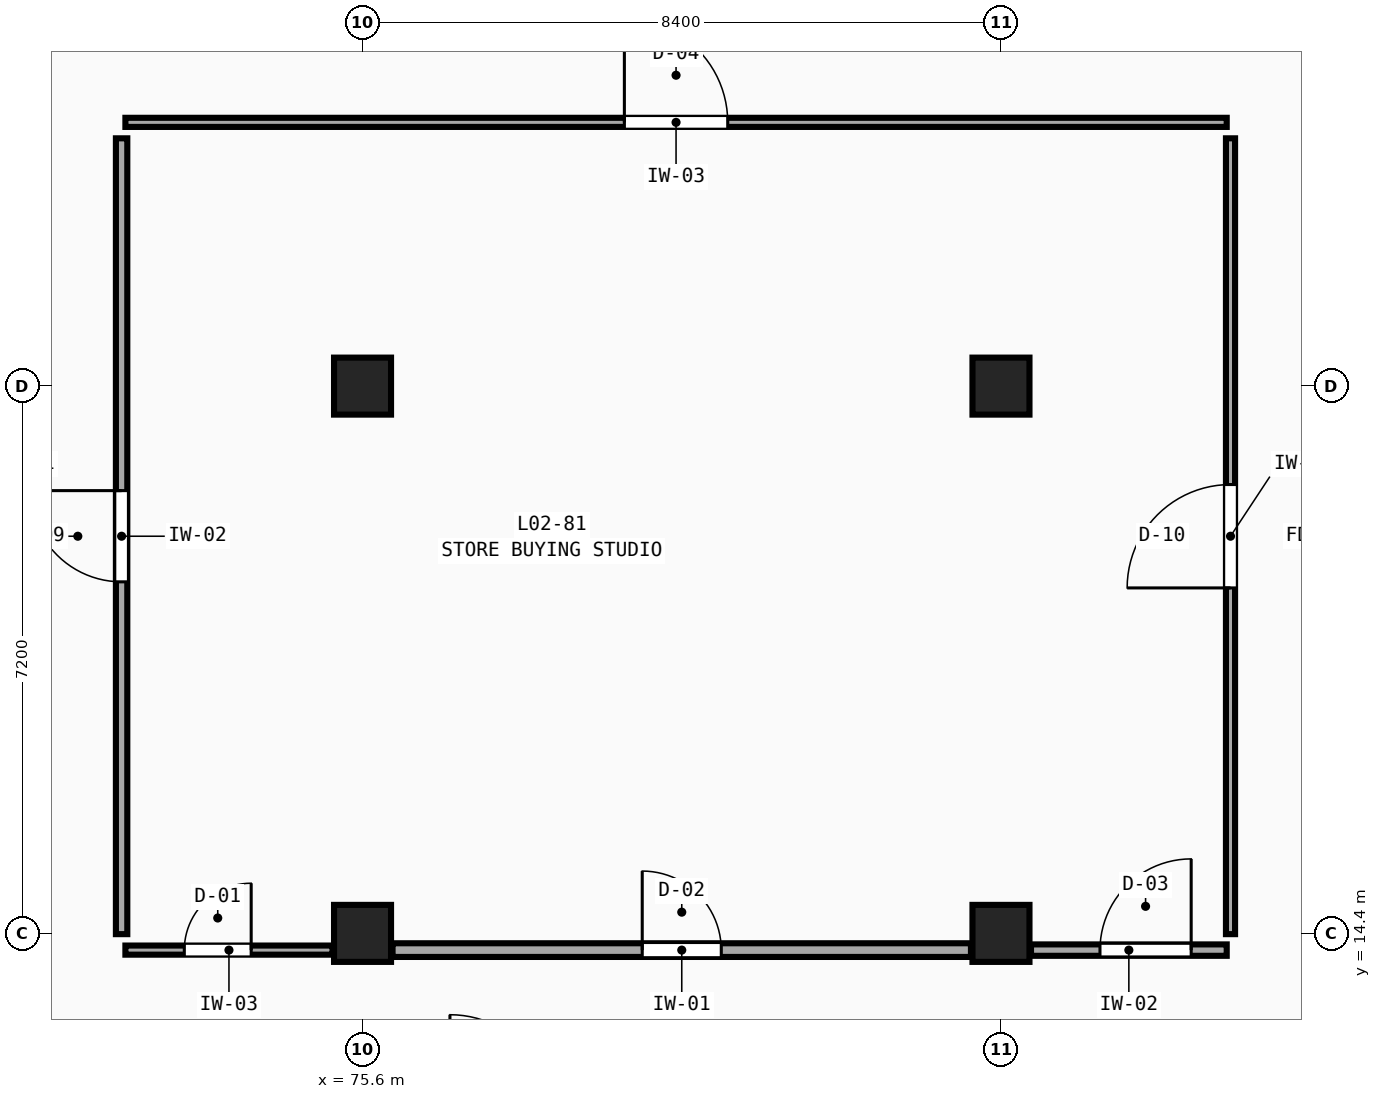
"""IFC4 building model, lengths in metres.
Left out: names, types, materials, properties, quantities, classifications, styles, units other than length and angle.
Written with IfcOpenShell. Run it as: python <this file> out.ifc"""

import sys

from ifc_helpers import new_model, si_unit, direction, frame, frame_2d, origin, origin_2d, place, context, subcontext, project, spatial, rectangle, extrude, element, fill, save


model = new_model("IFC4")
c1 = context("Model", 3, precision=1e-05, world=origin(), true_north=direction((0.0, 1.0)))
c2 = subcontext(c1, "Body", "Model", "MODEL_VIEW")
j1 = project(units=[si_unit("LENGTHUNIT", "METRE"), si_unit("PLANEANGLEUNIT", "RADIAN")], contexts=[c1])
p1 = place(None, origin())
s1 = spatial("IfcSite", under=j1, at=p1, CompositionType="ELEMENT")
p2 = place(p1, origin())
s2 = spatial("IfcBuilding", under=s1, at=p2, CompositionType="ELEMENT")
p3 = place(p2, frame((0.0, 0.0, 9.9)))
s3 = spatial("IfcBuildingStorey", under=s2, at=p3, CompositionType="ELEMENT", Elevation=9.9)
for number, where, z_axis, x_axis in (
    (1, (75.6, 14.4, 0.0), (0.0, 0.0, 1.0), (1.0, 0.0, 0.0)),
    (2, (75.6, 21.6, 0.0), (0.0, 0.0, 1.0), (1.0, 0.0, 0.0)),
    (3, (84.0, 14.4, 0.0), (0.0, 0.0, 1.0), (1.0, 0.0, 0.0)),
    (4, (84.0, 21.6, 0.0), (0.0, 0.0, 1.0), (1.0, 0.0, 0.0)),
):
    element("IfcColumn", number, at=place(p3, frame(where, z_axis=z_axis, x_axis=x_axis)), inside=s3, PredefinedType="COLUMN", context=c2, shape_type="SweptSolid", body=[
        extrude(rectangle(XDim=0.75, YDim=0.75, at=origin_2d()), origin(), (0.0, 0.0, 1.0), 4.5),
    ])
p4 = place(p3, frame((72.48, 14.18, 0.0), z_axis=(0.0, 0.0, 1.0), x_axis=(1.0, 0.0, 0.0)))
e5 = element("IfcWall", 5, at=p4, inside=s3, PredefinedType="PARTITIONING", context=c2, shape_type="SweptSolid", body=[
    extrude(rectangle(XDim=2.725, YDim=0.12, at=frame_2d((1.363, 0.0))), origin(), (0.0, 0.0, 1.0), 3.73),
])
p5 = place(p4, frame((0.775, 0.0, 0.0)))
e6 = element("IfcOpeningElement", 6, at=p5, cuts=e5, PredefinedType="OPENING", context=c2, shape_type="SweptSolid", body=[
    extrude(rectangle(XDim=0.88, YDim=2.05, at=frame_2d((0.44, 1.025))), frame((0.0, 0.08, 0.0), z_axis=(0.0, -1.0, 0.0), x_axis=(1.0, 0.0, 0.0)), (0.0, 0.0, 1.0), 0.16),
])
p6 = place(p3, frame((75.995, 14.18, 0.0), z_axis=(0.0, 0.0, 1.0), x_axis=(1.0, 0.0, 0.0)))
e7 = element("IfcWall", 7, at=p6, inside=s3, PredefinedType="PARTITIONING", context=c2, shape_type="SweptSolid", body=[
    extrude(rectangle(XDim=7.61, YDim=0.18, at=frame_2d((3.805, 0.0))), origin(), (0.0, 0.0, 1.0), 3.73),
])
p7 = place(p6, frame((3.285, 0.0, 0.0)))
e8 = element("IfcOpeningElement", 8, at=p7, cuts=e7, PredefinedType="OPENING", context=c2, shape_type="SweptSolid", body=[
    extrude(rectangle(XDim=1.04, YDim=2.05, at=frame_2d((0.52, 1.025))), frame((0.0, 0.11, 0.0), z_axis=(0.0, -1.0, 0.0), x_axis=(1.0, 0.0, 0.0)), (0.0, 0.0, 1.0), 0.22),
])
p8 = place(p3, frame((84.395, 14.18, 0.0), z_axis=(0.0, 0.0, 1.0), x_axis=(1.0, 0.0, 0.0)))
e9 = element("IfcWall", 9, at=p8, inside=s3, PredefinedType="PARTITIONING", context=c2, shape_type="SweptSolid", body=[
    extrude(rectangle(XDim=2.575, YDim=0.15, at=frame_2d((1.288, 0.0))), origin(), (0.0, 0.0, 1.0), 3.73),
])
p9 = place(p8, frame((0.907, 0.0, 0.0)))
e10 = element("IfcOpeningElement", 10, at=p9, cuts=e9, PredefinedType="OPENING", context=c2, shape_type="SweptSolid", body=[
    extrude(rectangle(XDim=1.2, YDim=2.05, at=frame_2d((0.6, 1.025))), frame((0.0, 0.095, 0.0), z_axis=(0.0, -1.0, 0.0), x_axis=(1.0, 0.0, 0.0)), (0.0, 0.0, 1.0), 0.19),
])
p10 = place(p3, frame((72.48, 25.07, 0.0), z_axis=(0.0, 0.0, 1.0), x_axis=(1.0, 0.0, 0.0)))
e11 = element("IfcWall", 11, at=p10, inside=s3, PredefinedType="PARTITIONING", context=c2, shape_type="SweptSolid", body=[
    extrude(rectangle(XDim=14.49, YDim=0.12, at=frame_2d((7.245, 0.0))), origin(), (0.0, 0.0, 1.0), 4.18),
])
p11 = place(p10, frame((6.565, 0.0, 0.0)))
e12 = element("IfcOpeningElement", 12, at=p11, cuts=e11, PredefinedType="OPENING", context=c2, shape_type="SweptSolid", body=[
    extrude(rectangle(XDim=1.36, YDim=2.05, at=frame_2d((0.68, 1.025))), frame((0.0, 0.08, 0.0), z_axis=(0.0, -1.0, 0.0), x_axis=(1.0, 0.0, 0.0)), (0.0, 0.0, 1.0), 0.16),
])
p12 = place(p3, frame((72.43, 14.39, 0.0), z_axis=(0.0, 0.0, 1.0), x_axis=(0.0, 1.0, 0.0)))
e13 = element("IfcWall", 13, at=p12, inside=s3, PredefinedType="PARTITIONING", context=c2, shape_type="SweptSolid", body=[
    extrude(rectangle(XDim=10.47, YDim=0.15, at=frame_2d((5.235, 0.0))), origin(), (0.0, 0.0, 1.0), 4.18),
])
p13 = place(p12, frame((4.635, 0.0, 0.0)))
e14 = element("IfcOpeningElement", 14, at=p13, cuts=e13, PredefinedType="OPENING", context=c2, shape_type="SweptSolid", body=[
    extrude(rectangle(XDim=1.2, YDim=2.13, at=frame_2d((0.6, 1.065))), frame((0.0, 0.095, 0.0), z_axis=(0.0, -1.0, 0.0), x_axis=(1.0, 0.0, 0.0)), (0.0, 0.0, 1.0), 0.19),
])
p14 = place(p3, frame((87.02, 14.39, 0.0), z_axis=(0.0, 0.0, 1.0), x_axis=(0.0, 1.0, 0.0)))
e15 = element("IfcWall", 15, at=p14, inside=s3, PredefinedType="PARTITIONING", context=c2, shape_type="SweptSolid", body=[
    extrude(rectangle(XDim=10.47, YDim=0.12, at=frame_2d((5.235, 0.0))), origin(), (0.0, 0.0, 1.0), 4.18),
])
p15 = place(p14, frame((4.555, 0.0, 0.0)))
e16 = element("IfcOpeningElement", 16, at=p15, cuts=e15, PredefinedType="OPENING", context=c2, shape_type="SweptSolid", body=[
    extrude(rectangle(XDim=1.36, YDim=2.13, at=frame_2d((0.68, 1.065))), frame((0.0, 0.08, 0.0), z_axis=(0.0, -1.0, 0.0), x_axis=(1.0, 0.0, 0.0)), (0.0, 0.0, 1.0), 0.16),
])
p16 = place(p5, origin())
e17 = element("IfcDoor", 17, at=p16, inside=s3, OperationType="SINGLE_SWING_RIGHT", PredefinedType="DOOR", context=c2, shape_type="SweptSolid", body=[
    extrude(rectangle(XDim=0.88, YDim=2.05, at=frame_2d((0.44, 1.025))), frame((0.0, 0.025, 0.0), z_axis=(0.0, -1.0, 0.0), x_axis=(1.0, 0.0, 0.0)), (0.0, 0.0, 1.0), 0.05),
])
fill(e6, e17)
p17 = place(p7, origin())
e18 = element("IfcDoor", 18, at=p17, inside=s3, OperationType="SINGLE_SWING_LEFT", PredefinedType="DOOR", context=c2, shape_type="SweptSolid", body=[
    extrude(rectangle(XDim=1.04, YDim=2.05, at=frame_2d((0.52, 1.025))), frame((0.0, 0.025, 0.0), z_axis=(0.0, -1.0, 0.0), x_axis=(1.0, 0.0, 0.0)), (0.0, 0.0, 1.0), 0.05),
])
fill(e8, e18)
p18 = place(p9, origin())
e19 = element("IfcDoor", 19, at=p18, inside=s3, OperationType="SINGLE_SWING_RIGHT", PredefinedType="DOOR", context=c2, shape_type="SweptSolid", body=[
    extrude(rectangle(XDim=1.2, YDim=2.05, at=frame_2d((0.6, 1.025))), frame((0.0, 0.025, 0.0), z_axis=(0.0, -1.0, 0.0), x_axis=(1.0, 0.0, 0.0)), (0.0, 0.0, 1.0), 0.05),
])
fill(e10, e19)
p19 = place(p11, origin())
e20 = element("IfcDoor", 20, at=p19, inside=s3, OperationType="SINGLE_SWING_LEFT", PredefinedType="DOOR", context=c2, shape_type="SweptSolid", body=[
    extrude(rectangle(XDim=1.36, YDim=2.05, at=frame_2d((0.68, 1.025))), frame((0.0, 0.025, 0.0), z_axis=(0.0, -1.0, 0.0), x_axis=(1.0, 0.0, 0.0)), (0.0, 0.0, 1.0), 0.05),
])
fill(e12, e20)
p20 = place(p13, origin())
e21 = element("IfcDoor", 21, at=p20, inside=s3, OperationType="SINGLE_SWING_RIGHT", PredefinedType="DOOR", context=c2, shape_type="SweptSolid", body=[
    extrude(rectangle(XDim=1.2, YDim=2.13, at=frame_2d((0.6, 1.065))), frame((0.0, 0.025, 0.0), z_axis=(0.0, -1.0, 0.0), x_axis=(1.0, 0.0, 0.0)), (0.0, 0.0, 1.0), 0.05),
])
fill(e14, e21)
p21 = place(p15, origin())
e22 = element("IfcDoor", 22, at=p21, inside=s3, OperationType="SINGLE_SWING_LEFT", PredefinedType="DOOR", context=c2, shape_type="SweptSolid", body=[
    extrude(rectangle(XDim=1.36, YDim=2.13, at=frame_2d((0.68, 1.065))), frame((0.0, 0.025, 0.0), z_axis=(0.0, -1.0, 0.0), x_axis=(1.0, 0.0, 0.0)), (0.0, 0.0, 1.0), 0.05),
])
fill(e16, e22)
save(model, sys.argv[1])
